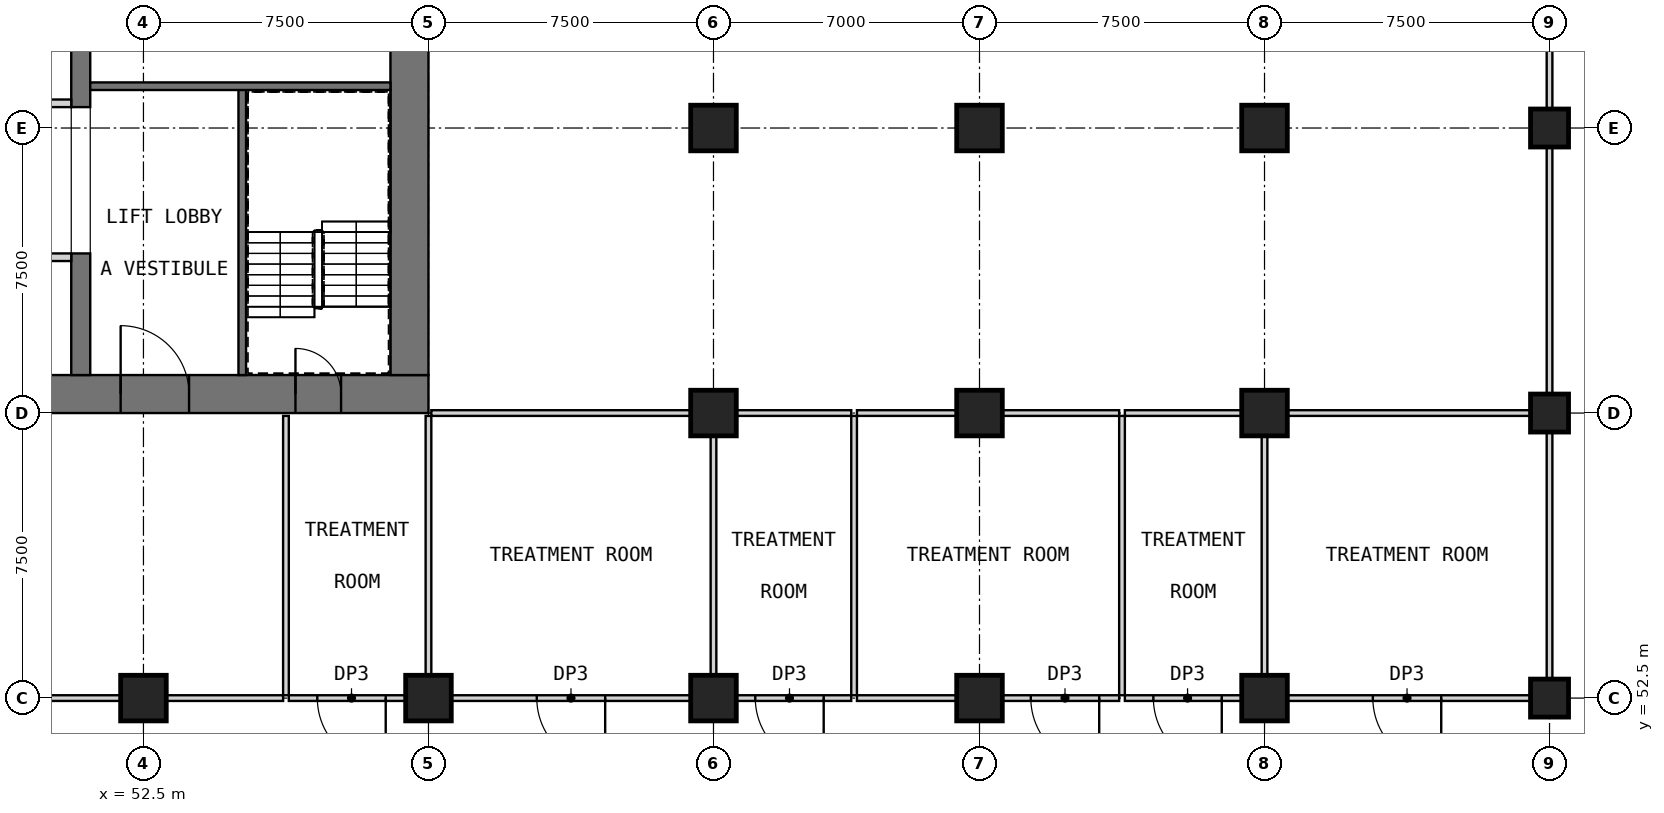
"""IFC4 building model, lengths in metres.
Left out: names, types, materials, properties, quantities, classifications, styles, units other than length and angle.
Written with IfcOpenShell. Run it as: python <this file> out.ifc"""

import sys

from ifc_helpers import new_model, si_unit, direction, frame, frame_2d, origin, origin_2d, place, context, subcontext, project, spatial, rectangle, extrude, element, fill, save


model = new_model("IFC4")
c1 = context("Model", 3, precision=1e-05, world=origin(), true_north=direction((0.0, 1.0)))
c2 = subcontext(c1, "Body", "Model", "MODEL_VIEW")
j1 = project(units=[si_unit("LENGTHUNIT", "METRE"), si_unit("PLANEANGLEUNIT", "RADIAN")], contexts=[c1])
p1 = place(None, origin())
s1 = spatial("IfcSite", under=j1, at=p1, CompositionType="ELEMENT")
p2 = place(p1, origin())
s2 = spatial("IfcBuilding", under=s1, at=p2, CompositionType="ELEMENT")
p3 = place(p2, frame((0.0, 0.0, 29.0)))
s3 = spatial("IfcBuildingStorey", under=s2, at=p3, CompositionType="ELEMENT", Elevation=29.0)
for number, where, z_axis, x_axis in (
    (1, (52.5, 52.5, 0.0), (0.0, 0.0, 1.0), (1.0, 0.0, 0.0)),
    (2, (60.0, 52.5, 0.0), (0.0, 0.0, 1.0), (1.0, 0.0, 0.0)),
    (3, (67.5, 52.5, 0.0), (0.0, 0.0, 1.0), (1.0, 0.0, 0.0)),
    (4, (67.5, 60.0, 0.0), (0.0, 0.0, 1.0), (1.0, 0.0, 0.0)),
    (5, (67.5, 67.5, 0.0), (0.0, 0.0, 1.0), (1.0, 0.0, 0.0)),
    (6, (74.5, 52.5, 0.0), (0.0, 0.0, 1.0), (1.0, 0.0, 0.0)),
    (7, (74.5, 60.0, 0.0), (0.0, 0.0, 1.0), (1.0, 0.0, 0.0)),
    (8, (74.5, 67.5, 0.0), (0.0, 0.0, 1.0), (1.0, 0.0, 0.0)),
    (9, (82.0, 52.5, 0.0), (0.0, 0.0, 1.0), (1.0, 0.0, 0.0)),
    (10, (82.0, 60.0, 0.0), (0.0, 0.0, 1.0), (1.0, 0.0, 0.0)),
    (11, (82.0, 67.5, 0.0), (0.0, 0.0, 1.0), (1.0, 0.0, 0.0)),
):
    element("IfcColumn", number, at=place(p3, frame(where, z_axis=z_axis, x_axis=x_axis)), inside=s3, PredefinedType="COLUMN", context=c2, shape_type="SweptSolid", body=[
        extrude(rectangle(XDim=1.2, YDim=1.2, at=origin_2d()), origin(), (0.0, 0.0, 1.0), 5.0),
    ])
for number, where, z_axis, x_axis in (
    (12, (89.5, 52.5, 0.0), (0.0, 0.0, 1.0), (1.0, 0.0, 0.0)),
    (13, (89.5, 60.0, 0.0), (0.0, 0.0, 1.0), (1.0, 0.0, 0.0)),
    (14, (89.5, 67.5, 0.0), (0.0, 0.0, 1.0), (1.0, 0.0, 0.0)),
):
    element("IfcColumn", number, at=place(p3, frame(where, z_axis=z_axis, x_axis=x_axis)), inside=s3, PredefinedType="COLUMN", context=c2, shape_type="SweptSolid", body=[
        extrude(rectangle(XDim=1.0, YDim=1.0, at=origin_2d()), origin(), (0.0, 0.0, 1.0), 5.0),
    ])
p4 = place(p3, frame((30.0, 60.5, 0.0), z_axis=(0.0, 0.0, 1.0), x_axis=(1.0, 0.0, 0.0)))
e15 = element("IfcWall", 15, at=p4, inside=s3, PredefinedType="SHEAR", context=c2, shape_type="SweptSolid", body=[
    extrude(rectangle(XDim=30.0, YDim=1.0, at=frame_2d((15.0, 0.0))), origin(), (0.0, 0.0, 1.0), 5.0),
])
p5 = place(p4, frame((21.9, 0.0, 0.0)))
e16 = element("IfcOpeningElement", 16, at=p5, cuts=e15, PredefinedType="OPENING", context=c2, shape_type="SweptSolid", body=[
    extrude(rectangle(XDim=1.8, YDim=2.1, at=frame_2d((0.9, 1.05))), frame((0.0, 0.51, 0.0), z_axis=(0.0, -1.0, 0.0), x_axis=(1.0, 0.0, 0.0)), (0.0, 0.0, 1.0), 1.02),
])
p6 = place(p4, frame((26.5, 0.0, 0.0)))
e17 = element("IfcOpeningElement", 17, at=p6, cuts=e15, PredefinedType="OPENING", context=c2, shape_type="SweptSolid", body=[
    extrude(rectangle(XDim=1.2, YDim=2.1, at=frame_2d((0.6, 1.05))), frame((0.0, 0.51, 0.0), z_axis=(0.0, -1.0, 0.0), x_axis=(1.0, 0.0, 0.0)), (0.0, 0.0, 1.0), 1.02),
])
p7 = place(p3, frame((59.5, 61.0, 0.0), z_axis=(0.0, 0.0, 1.0), x_axis=(0.0, 1.0, 0.0)))
e18 = element("IfcWall", 18, at=p7, inside=s3, PredefinedType="SHEAR", context=c2, shape_type="SweptSolid", body=[
    extrude(rectangle(XDim=20.5, YDim=1.0, at=frame_2d((10.25, 0.0))), origin(), (0.0, 0.0, 1.0), 5.0),
])
p8 = place(p7, frame((14.5, 0.0, 0.0)))
e19 = element("IfcOpeningElement", 19, at=p8, cuts=e18, PredefinedType="OPENING", context=c2, shape_type="SweptSolid", body=[
    extrude(rectangle(XDim=1.8, YDim=2.1, at=frame_2d((0.9, 1.05))), frame((0.0, 0.51, 0.0), z_axis=(0.0, -1.0, 0.0), x_axis=(1.0, 0.0, 0.0)), (0.0, 0.0, 1.0), 1.02),
])
p9 = place(p3, frame((50.85, 61.0, 0.0), z_axis=(0.0, 0.0, 1.0), x_axis=(0.0, 1.0, 0.0)))
e20 = element("IfcWall", 20, at=p9, inside=s3, PredefinedType="SHEAR", context=c2, shape_type="SweptSolid", body=[
    extrude(rectangle(XDim=3.2, YDim=0.5, at=frame_2d((1.6, 0.0))), origin(), (0.0, 0.0, 1.0), 5.0),
])
p10 = place(p3, frame((50.85, 68.05, 0.0), z_axis=(0.0, 0.0, 1.0), x_axis=(0.0, 1.0, 0.0)))
e21 = element("IfcWall", 21, at=p10, inside=s3, PredefinedType="SHEAR", context=c2, shape_type="SweptSolid", body=[
    extrude(rectangle(XDim=6.4, YDim=0.5, at=frame_2d((3.2, 0.0))), origin(), (0.0, 0.0, 1.0), 5.0),
])
p11 = place(p3, frame((48.0, 64.1, 0.0), z_axis=(0.0, 0.0, 1.0), x_axis=(1.0, 0.0, 0.0)))
e22 = element("IfcWall", 22, at=p11, inside=s3, PredefinedType="PARTITIONING", context=c2, shape_type="SweptSolid", body=[
    extrude(rectangle(XDim=2.6, YDim=0.2, at=frame_2d((1.3, 0.0))), origin(), (0.0, 0.0, 1.0), 4.75),
])
p12 = place(p11, frame((0.85, 0.0, 0.0)))
e23 = element("IfcOpeningElement", 23, at=p12, cuts=e22, PredefinedType="OPENING", context=c2, shape_type="SweptSolid", body=[
    extrude(rectangle(XDim=0.9, YDim=2.1, at=frame_2d((0.45, 1.05))), frame((0.0, 0.11, 0.0), z_axis=(0.0, -1.0, 0.0), x_axis=(1.0, 0.0, 0.0)), (0.0, 0.0, 1.0), 0.22),
])
p13 = place(p3, frame((48.0, 68.15, 0.0), z_axis=(0.0, 0.0, 1.0), x_axis=(1.0, 0.0, 0.0)))
e24 = element("IfcWall", 24, at=p13, inside=s3, PredefinedType="PARTITIONING", context=c2, shape_type="SweptSolid", body=[
    extrude(rectangle(XDim=2.6, YDim=0.2, at=frame_2d((1.3, 0.0))), origin(), (0.0, 0.0, 1.0), 4.75),
])
p14 = place(p13, frame((0.85, 0.0, 0.0)))
e25 = element("IfcOpeningElement", 25, at=p14, cuts=e24, PredefinedType="OPENING", context=c2, shape_type="SweptSolid", body=[
    extrude(rectangle(XDim=0.9, YDim=2.1, at=frame_2d((0.45, 1.05))), frame((0.0, 0.11, 0.0), z_axis=(0.0, -1.0, 0.0), x_axis=(1.0, 0.0, 0.0)), (0.0, 0.0, 1.0), 0.22),
])
p15 = place(p3, frame((55.1, 61.0, 0.0), z_axis=(0.0, 0.0, 1.0), x_axis=(0.0, 1.0, 0.0)))
e26 = element("IfcWall", 26, at=p15, inside=s3, PredefinedType="SOLIDWALL", context=c2, shape_type="SweptSolid", body=[
    extrude(rectangle(XDim=7.6, YDim=0.2, at=frame_2d((3.8, 0.0))), origin(), (0.0, 0.0, 1.0), 4.75),
])
p16 = place(p3, frame((51.1, 68.6, 0.0), z_axis=(0.0, 0.0, 1.0), x_axis=(1.0, 0.0, 0.0)))
e27 = element("IfcWall", 27, at=p16, inside=s3, PredefinedType="SOLIDWALL", context=c2, shape_type="SweptSolid", body=[
    extrude(rectangle(XDim=7.9, YDim=0.2, at=frame_2d((3.95, 0.0))), origin(), (0.0, 0.0, 1.0), 4.75),
])
p17 = place(p3, frame((51.9, 52.5, 0.0), z_axis=(0.0, 0.0, 1.0), x_axis=(-1.0, 0.0, 0.0)))
e28 = element("IfcWall", 28, at=p17, inside=s3, PredefinedType="PARTITIONING", context=c2, shape_type="SweptSolid", body=[
    extrude(rectangle(XDim=6.3, YDim=0.15, at=frame_2d((3.15, 0.0))), origin(), (0.0, 0.0, 1.0), 4.7),
])
p18 = place(p17, frame((4.0, 0.0, 0.0)))
e29 = element("IfcOpeningElement", 29, at=p18, cuts=e28, PredefinedType="OPENING", context=c2, shape_type="SweptSolid", body=[
    extrude(rectangle(XDim=1.8, YDim=2.4, at=frame_2d((0.9, 1.2))), frame((0.0, 0.085, 0.0), z_axis=(0.0, -1.0, 0.0), x_axis=(1.0, 0.0, 0.0)), (0.0, 0.0, 1.0), 0.17),
])
p19 = place(p3, frame((53.1, 52.5, 0.0), z_axis=(0.0, 0.0, 1.0), x_axis=(1.0, 0.0, 0.0)))
e30 = element("IfcWall", 30, at=p19, inside=s3, PredefinedType="PARTITIONING", context=c2, shape_type="SweptSolid", body=[
    extrude(rectangle(XDim=3.075, YDim=0.15, at=frame_2d((1.538, 0.0))), origin(), (0.0, 0.0, 1.0), 4.7),
])
p20 = place(p3, frame((59.4, 52.5, 0.0), z_axis=(0.0, 0.0, 1.0), x_axis=(-1.0, 0.0, 0.0)))
e31 = element("IfcWall", 31, at=p20, inside=s3, PredefinedType="PARTITIONING", context=c2, shape_type="SweptSolid", body=[
    extrude(rectangle(XDim=3.075, YDim=0.15, at=frame_2d((1.538, 0.0))), origin(), (0.0, 0.0, 1.0), 4.7),
])
p21 = place(p20, frame((0.525, 0.0, 0.0)))
e32 = element("IfcOpeningElement", 32, at=p21, cuts=e31, PredefinedType="OPENING", context=c2, shape_type="SweptSolid", body=[
    extrude(rectangle(XDim=1.8, YDim=2.4, at=frame_2d((0.9, 1.2))), frame((0.0, 0.085, 0.0), z_axis=(0.0, -1.0, 0.0), x_axis=(1.0, 0.0, 0.0)), (0.0, 0.0, 1.0), 0.17),
])
p22 = place(p3, frame((66.9, 52.5, 0.0), z_axis=(0.0, 0.0, 1.0), x_axis=(-1.0, 0.0, 0.0)))
e33 = element("IfcWall", 33, at=p22, inside=s3, PredefinedType="PARTITIONING", context=c2, shape_type="SweptSolid", body=[
    extrude(rectangle(XDim=6.3, YDim=0.15, at=frame_2d((3.15, 0.0))), origin(), (0.0, 0.0, 1.0), 4.7),
])
p23 = place(p22, frame((2.25, 0.0, 0.0)))
e34 = element("IfcOpeningElement", 34, at=p23, cuts=e33, PredefinedType="OPENING", context=c2, shape_type="SweptSolid", body=[
    extrude(rectangle(XDim=1.8, YDim=2.4, at=frame_2d((0.9, 1.2))), frame((0.0, 0.085, 0.0), z_axis=(0.0, -1.0, 0.0), x_axis=(1.0, 0.0, 0.0)), (0.0, 0.0, 1.0), 0.17),
])
p24 = place(p3, frame((71.125, 52.5, 0.0), z_axis=(0.0, 0.0, 1.0), x_axis=(-1.0, 0.0, 0.0)))
e35 = element("IfcWall", 35, at=p24, inside=s3, PredefinedType="PARTITIONING", context=c2, shape_type="SweptSolid", body=[
    extrude(rectangle(XDim=3.025, YDim=0.15, at=frame_2d((1.512, 0.0))), origin(), (0.0, 0.0, 1.0), 4.7),
])
p25 = place(p24, frame((0.725, 0.0, 0.0)))
e36 = element("IfcOpeningElement", 36, at=p25, cuts=e35, PredefinedType="OPENING", context=c2, shape_type="SweptSolid", body=[
    extrude(rectangle(XDim=1.8, YDim=2.4, at=frame_2d((0.9, 1.2))), frame((0.0, 0.085, 0.0), z_axis=(0.0, -1.0, 0.0), x_axis=(1.0, 0.0, 0.0)), (0.0, 0.0, 1.0), 0.17),
])
p26 = place(p3, frame((71.275, 52.5, 0.0), z_axis=(0.0, 0.0, 1.0), x_axis=(1.0, 0.0, 0.0)))
e37 = element("IfcWall", 37, at=p26, inside=s3, PredefinedType="PARTITIONING", context=c2, shape_type="SweptSolid", body=[
    extrude(rectangle(XDim=2.625, YDim=0.15, at=frame_2d((1.312, 0.0))), origin(), (0.0, 0.0, 1.0), 4.7),
])
p27 = place(p3, frame((78.175, 52.5, 0.0), z_axis=(0.0, 0.0, 1.0), x_axis=(-1.0, 0.0, 0.0)))
e38 = element("IfcWall", 38, at=p27, inside=s3, PredefinedType="PARTITIONING", context=c2, shape_type="SweptSolid", body=[
    extrude(rectangle(XDim=3.075, YDim=0.15, at=frame_2d((1.538, 0.0))), origin(), (0.0, 0.0, 1.0), 4.7),
])
p28 = place(p27, frame((0.525, 0.0, 0.0)))
e39 = element("IfcOpeningElement", 39, at=p28, cuts=e38, PredefinedType="OPENING", context=c2, shape_type="SweptSolid", body=[
    extrude(rectangle(XDim=1.8, YDim=2.4, at=frame_2d((0.9, 1.2))), frame((0.0, 0.085, 0.0), z_axis=(0.0, -1.0, 0.0), x_axis=(1.0, 0.0, 0.0)), (0.0, 0.0, 1.0), 0.17),
])
p29 = place(p3, frame((81.4, 52.5, 0.0), z_axis=(0.0, 0.0, 1.0), x_axis=(-1.0, 0.0, 0.0)))
e40 = element("IfcWall", 40, at=p29, inside=s3, PredefinedType="PARTITIONING", context=c2, shape_type="SweptSolid", body=[
    extrude(rectangle(XDim=3.075, YDim=0.15, at=frame_2d((1.538, 0.0))), origin(), (0.0, 0.0, 1.0), 4.7),
])
p30 = place(p29, frame((0.525, 0.0, 0.0)))
e41 = element("IfcOpeningElement", 41, at=p30, cuts=e40, PredefinedType="OPENING", context=c2, shape_type="SweptSolid", body=[
    extrude(rectangle(XDim=1.8, YDim=2.4, at=frame_2d((0.9, 1.2))), frame((0.0, 0.085, 0.0), z_axis=(0.0, -1.0, 0.0), x_axis=(1.0, 0.0, 0.0)), (0.0, 0.0, 1.0), 0.17),
])
p31 = place(p3, frame((89.0, 52.5, 0.0), z_axis=(0.0, 0.0, 1.0), x_axis=(-1.0, 0.0, 0.0)))
e42 = element("IfcWall", 42, at=p31, inside=s3, PredefinedType="PARTITIONING", context=c2, shape_type="SweptSolid", body=[
    extrude(rectangle(XDim=6.4, YDim=0.15, at=frame_2d((3.2, 0.0))), origin(), (0.0, 0.0, 1.0), 4.7),
])
p32 = place(p31, frame((2.35, 0.0, 0.0)))
e43 = element("IfcOpeningElement", 43, at=p32, cuts=e42, PredefinedType="OPENING", context=c2, shape_type="SweptSolid", body=[
    extrude(rectangle(XDim=1.8, YDim=2.4, at=frame_2d((0.9, 1.2))), frame((0.0, 0.085, 0.0), z_axis=(0.0, -1.0, 0.0), x_axis=(1.0, 0.0, 0.0)), (0.0, 0.0, 1.0), 0.17),
])
p33 = place(p3, frame((60.075, 60.0, 0.0), z_axis=(0.0, 0.0, 1.0), x_axis=(1.0, 0.0, 0.0)))
e44 = element("IfcWall", 44, at=p33, inside=s3, PredefinedType="PARTITIONING", context=c2, shape_type="SweptSolid", body=[
    extrude(rectangle(XDim=6.825, YDim=0.15, at=frame_2d((3.413, 0.0))), origin(), (0.0, 0.0, 1.0), 4.7),
])
p34 = place(p3, frame((68.1, 60.0, 0.0), z_axis=(0.0, 0.0, 1.0), x_axis=(1.0, 0.0, 0.0)))
e45 = element("IfcWall", 45, at=p34, inside=s3, PredefinedType="PARTITIONING", context=c2, shape_type="SweptSolid", body=[
    extrude(rectangle(XDim=3.025, YDim=0.15, at=frame_2d((1.512, 0.0))), origin(), (0.0, 0.0, 1.0), 4.7),
])
p35 = place(p3, frame((71.275, 60.0, 0.0), z_axis=(0.0, 0.0, 1.0), x_axis=(1.0, 0.0, 0.0)))
e46 = element("IfcWall", 46, at=p35, inside=s3, PredefinedType="PARTITIONING", context=c2, shape_type="SweptSolid", body=[
    extrude(rectangle(XDim=2.625, YDim=0.15, at=frame_2d((1.312, 0.0))), origin(), (0.0, 0.0, 1.0), 4.7),
])
for number, where, z_axis, x_axis in (
    (47, (75.1, 60.0, 0.0), (0.0, 0.0, 1.0), (1.0, 0.0, 0.0)),
    (48, (78.325, 60.0, 0.0), (0.0, 0.0, 1.0), (1.0, 0.0, 0.0)),
):
    element("IfcWall", number, at=place(p3, frame(where, z_axis=z_axis, x_axis=x_axis)), inside=s3, PredefinedType="PARTITIONING", context=c2, shape_type="SweptSolid", body=[
        extrude(rectangle(XDim=3.075, YDim=0.15, at=frame_2d((1.538, 0.0))), origin(), (0.0, 0.0, 1.0), 4.7),
    ])
p36 = place(p3, frame((82.6, 60.0, 0.0), z_axis=(0.0, 0.0, 1.0), x_axis=(1.0, 0.0, 0.0)))
e49 = element("IfcWall", 49, at=p36, inside=s3, PredefinedType="PARTITIONING", context=c2, shape_type="SweptSolid", body=[
    extrude(rectangle(XDim=6.4, YDim=0.15, at=frame_2d((3.2, 0.0))), origin(), (0.0, 0.0, 1.0), 4.7),
])
p37 = place(p3, frame((56.25, 52.575, 0.0), z_axis=(0.0, 0.0, 1.0), x_axis=(0.0, 1.0, 0.0)))
e50 = element("IfcWall", 50, at=p37, inside=s3, PredefinedType="PARTITIONING", context=c2, shape_type="SweptSolid", body=[
    extrude(rectangle(XDim=7.35, YDim=0.15, at=frame_2d((3.675, 0.0))), origin(), (0.0, 0.0, 1.0), 4.7),
])
for number, where, z_axis, x_axis in (
    (51, (89.5, 53.0, 0.0), (0.0, 0.0, 1.0), (0.0, 1.0, 0.0)),
    (52, (89.5, 60.5, 0.0), (0.0, 0.0, 1.0), (0.0, 1.0, 0.0)),
    (53, (89.5, 68.0, 0.0), (0.0, 0.0, 1.0), (0.0, 1.0, 0.0)),
):
    element("IfcWall", number, at=place(p3, frame(where, z_axis=z_axis, x_axis=x_axis)), inside=s3, PredefinedType="PARTITIONING", context=c2, shape_type="SweptSolid", body=[
        extrude(rectangle(XDim=6.5, YDim=0.15, at=frame_2d((3.25, 0.0))), origin(), (0.0, 0.0, 1.0), 4.25),
    ])
p38 = place(p3, frame((60.0, 53.1, 0.0), z_axis=(0.0, 0.0, 1.0), x_axis=(0.0, 1.0, 0.0)))
e54 = element("IfcWall", 54, at=p38, inside=s3, PredefinedType="PARTITIONING", context=c2, shape_type="SweptSolid", body=[
    extrude(rectangle(XDim=6.825, YDim=0.15, at=frame_2d((3.413, 0.0))), origin(), (0.0, 0.0, 1.0), 4.7),
])
p39 = place(p3, frame((67.5, 53.1, 0.0), z_axis=(0.0, 0.0, 1.0), x_axis=(0.0, 1.0, 0.0)))
e55 = element("IfcWall", 55, at=p39, inside=s3, PredefinedType="PARTITIONING", context=c2, shape_type="SweptSolid", body=[
    extrude(rectangle(XDim=6.3, YDim=0.15, at=frame_2d((3.15, 0.0))), origin(), (0.0, 0.0, 1.0), 4.7),
])
for number, where, z_axis, x_axis in (
    (56, (71.2, 52.575, 0.0), (0.0, 0.0, 1.0), (0.0, 1.0, 0.0)),
    (57, (78.25, 52.575, 0.0), (0.0, 0.0, 1.0), (0.0, 1.0, 0.0)),
):
    element("IfcWall", number, at=place(p3, frame(where, z_axis=z_axis, x_axis=x_axis)), inside=s3, PredefinedType="PARTITIONING", context=c2, shape_type="SweptSolid", body=[
        extrude(rectangle(XDim=7.35, YDim=0.15, at=frame_2d((3.675, 0.0))), origin(), (0.0, 0.0, 1.0), 4.7),
    ])
p40 = place(p3, frame((82.0, 53.1, 0.0), z_axis=(0.0, 0.0, 1.0), x_axis=(0.0, 1.0, 0.0)))
e58 = element("IfcWall", 58, at=p40, inside=s3, PredefinedType="PARTITIONING", context=c2, shape_type="SweptSolid", body=[
    extrude(rectangle(XDim=6.3, YDim=0.15, at=frame_2d((3.15, 0.0))), origin(), (0.0, 0.0, 1.0), 4.7),
])
p41 = place(p5, origin())
e59 = element("IfcDoor", 59, at=p41, inside=s3, OperationType="DOUBLE_DOOR_SINGLE_SWING", PredefinedType="DOOR", context=c2, shape_type="SweptSolid", body=[
    extrude(rectangle(XDim=1.8, YDim=2.1, at=frame_2d((0.9, 1.05))), frame((0.0, 0.025, 0.0), z_axis=(0.0, -1.0, 0.0), x_axis=(1.0, 0.0, 0.0)), (0.0, 0.0, 1.0), 0.05),
])
fill(e16, e59)
p42 = place(p6, origin())
e60 = element("IfcDoor", 60, at=p42, inside=s3, OperationType="SINGLE_SWING_LEFT", PredefinedType="DOOR", context=c2, shape_type="SweptSolid", body=[
    extrude(rectangle(XDim=1.2, YDim=2.1, at=frame_2d((0.6, 1.05))), frame((0.0, 0.025, 0.0), z_axis=(0.0, -1.0, 0.0), x_axis=(1.0, 0.0, 0.0)), (0.0, 0.0, 1.0), 0.05),
])
fill(e17, e60)
p43 = place(p21, origin())
e61 = element("IfcDoor", 61, at=p43, inside=s3, OperationType="SINGLE_SWING_LEFT", PredefinedType="DOOR", context=c2, shape_type="SweptSolid", body=[
    extrude(rectangle(XDim=1.8, YDim=2.4, at=frame_2d((0.9, 1.2))), frame((0.0, 0.025, 0.0), z_axis=(0.0, -1.0, 0.0), x_axis=(1.0, 0.0, 0.0)), (0.0, 0.0, 1.0), 0.05),
])
fill(e32, e61)
p44 = place(p23, origin())
e62 = element("IfcDoor", 62, at=p44, inside=s3, OperationType="SINGLE_SWING_LEFT", PredefinedType="DOOR", context=c2, shape_type="SweptSolid", body=[
    extrude(rectangle(XDim=1.8, YDim=2.4, at=frame_2d((0.9, 1.2))), frame((0.0, 0.025, 0.0), z_axis=(0.0, -1.0, 0.0), x_axis=(1.0, 0.0, 0.0)), (0.0, 0.0, 1.0), 0.05),
])
fill(e34, e62)
p45 = place(p25, origin())
e63 = element("IfcDoor", 63, at=p45, inside=s3, OperationType="SINGLE_SWING_LEFT", PredefinedType="DOOR", context=c2, shape_type="SweptSolid", body=[
    extrude(rectangle(XDim=1.8, YDim=2.4, at=frame_2d((0.9, 1.2))), frame((0.0, 0.025, 0.0), z_axis=(0.0, -1.0, 0.0), x_axis=(1.0, 0.0, 0.0)), (0.0, 0.0, 1.0), 0.05),
])
fill(e36, e63)
p46 = place(p28, origin())
e64 = element("IfcDoor", 64, at=p46, inside=s3, OperationType="SINGLE_SWING_LEFT", PredefinedType="DOOR", context=c2, shape_type="SweptSolid", body=[
    extrude(rectangle(XDim=1.8, YDim=2.4, at=frame_2d((0.9, 1.2))), frame((0.0, 0.025, 0.0), z_axis=(0.0, -1.0, 0.0), x_axis=(1.0, 0.0, 0.0)), (0.0, 0.0, 1.0), 0.05),
])
fill(e39, e64)
p47 = place(p30, origin())
e65 = element("IfcDoor", 65, at=p47, inside=s3, OperationType="SINGLE_SWING_LEFT", PredefinedType="DOOR", context=c2, shape_type="SweptSolid", body=[
    extrude(rectangle(XDim=1.8, YDim=2.4, at=frame_2d((0.9, 1.2))), frame((0.0, 0.025, 0.0), z_axis=(0.0, -1.0, 0.0), x_axis=(1.0, 0.0, 0.0)), (0.0, 0.0, 1.0), 0.05),
])
fill(e41, e65)
p48 = place(p32, origin())
e66 = element("IfcDoor", 66, at=p48, inside=s3, OperationType="SINGLE_SWING_LEFT", PredefinedType="DOOR", context=c2, shape_type="SweptSolid", body=[
    extrude(rectangle(XDim=1.8, YDim=2.4, at=frame_2d((0.9, 1.2))), frame((0.0, 0.025, 0.0), z_axis=(0.0, -1.0, 0.0), x_axis=(1.0, 0.0, 0.0)), (0.0, 0.0, 1.0), 0.05),
])
fill(e43, e66)
save(model, sys.argv[1])
